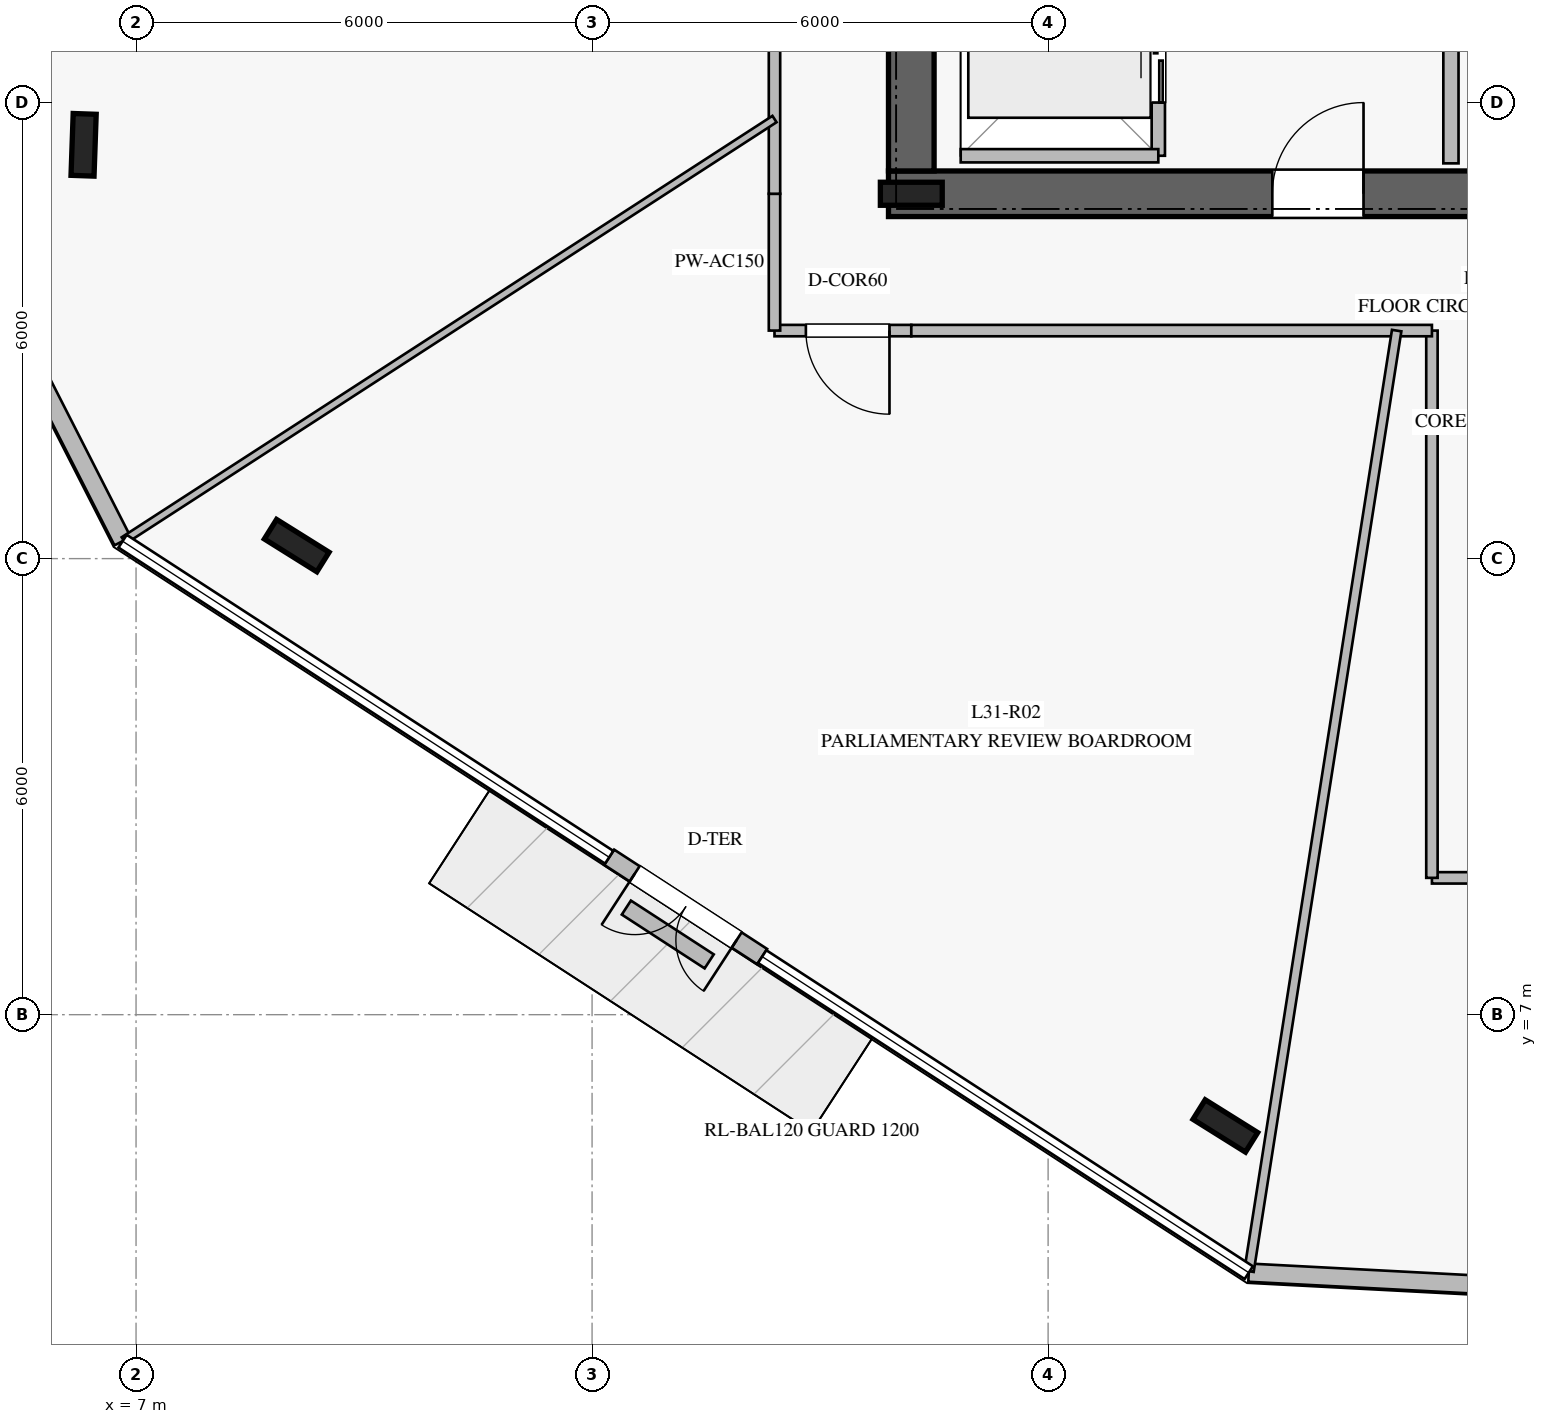
"""IFC4 building model, lengths in metres.
Left out: names, types, materials, properties, quantities, classifications, styles, units other than length and angle.
Written with IfcOpenShell. Run it as: python <this file> out.ifc"""

import sys

from ifc_helpers import new_model, si_unit, direction, frame, frame_2d, origin, origin_2d, place, context, subcontext, project, spatial, rectangle, i_section, extrude, element, fill, save


model = new_model("IFC4")
c1 = context("Model", 3, precision=1e-05, world=origin(), true_north=direction((0.0, 1.0)))
c2 = subcontext(c1, "Body", "Model", "MODEL_VIEW")
j1 = project(units=[si_unit("LENGTHUNIT", "METRE"), si_unit("PLANEANGLEUNIT", "RADIAN")], contexts=[c1])
p1 = place(None, origin())
s1 = spatial("IfcSite", under=j1, at=p1, CompositionType="ELEMENT")
p2 = place(p1, origin())
s2 = spatial("IfcBuilding", under=s1, at=p2, CompositionType="ELEMENT")
p3 = place(p2, frame((0.0, 0.0, 130.4)))
s3 = spatial("IfcBuildingStorey", under=s2, at=p3, CompositionType="ELEMENT", Elevation=130.4)
p4 = place(p3, frame((16.9, 17.8, 0.0), z_axis=(0.0, 0.0, 1.0), x_axis=(1.0, 0.0, 0.0)))
e1 = element("IfcWall", 1, at=p4, inside=s3, PredefinedType="SHEAR", context=c2, shape_type="SweptSolid", body=[
    extrude(rectangle(XDim=16.2, YDim=0.6, at=frame_2d((8.1, 0.0))), origin(), (0.0, 0.0, 1.0), 3.76),
])
p5 = place(p4, frame((5.05, 0.0, 0.0)))
e2 = element("IfcOpeningElement", 2, at=p5, cuts=e1, PredefinedType="OPENING", context=c2, shape_type="SweptSolid", body=[
    extrude(rectangle(XDim=1.2, YDim=2.25, at=frame_2d((0.6, 1.125))), frame((0.0, 0.31, 0.0), z_axis=(0.0, -1.0, 0.0), x_axis=(1.0, 0.0, 0.0)), (0.0, 0.0, 1.0), 0.62),
])
p6 = place(p4, frame((14.0, 0.0, 0.0)))
e3 = element("IfcOpeningElement", 3, at=p6, cuts=e1, PredefinedType="OPENING", context=c2, shape_type="SweptSolid", body=[
    extrude(rectangle(XDim=0.9, YDim=2.1, at=frame_2d((0.45, 1.05))), frame((0.0, 0.31, 0.0), z_axis=(0.0, -1.0, 0.0), x_axis=(1.0, 0.0, 0.0)), (0.0, 0.0, 1.0), 0.62),
])
p7 = place(p4, frame((9.25, 0.0, 0.0)))
e4 = element("IfcOpeningElement", 4, at=p7, cuts=e1, PredefinedType="OPENING", context=c2, shape_type="SweptSolid", body=[
    extrude(rectangle(XDim=1.1, YDim=2.2, at=frame_2d((0.55, 1.1))), frame((0.0, 0.31, 0.0), z_axis=(0.0, -1.0, 0.0), x_axis=(1.0, 0.0, 0.0)), (0.0, 0.0, 1.0), 0.62),
])
p8 = place(p3, frame((17.2, 31.9, 0.0), z_axis=(0.0, 0.0, 1.0), x_axis=(0.0, -1.0, 0.0)))
e5 = element("IfcWall", 5, at=p8, inside=s3, PredefinedType="SHEAR", context=c2, shape_type="SweptSolid", body=[
    extrude(rectangle(XDim=13.8, YDim=0.6, at=frame_2d((6.9, 0.0))), origin(), (0.0, 0.0, 1.0), 3.76),
])
p9 = place(p8, frame((2.05, 0.0, 0.0)))
e6 = element("IfcOpeningElement", 6, at=p9, cuts=e5, PredefinedType="OPENING", context=c2, shape_type="SweptSolid", body=[
    extrude(rectangle(XDim=1.5, YDim=2.2, at=frame_2d((0.75, 1.1))), frame((0.0, 0.31, 0.0), z_axis=(0.0, -1.0, 0.0), x_axis=(1.0, 0.0, 0.0)), (0.0, 0.0, 1.0), 0.62),
])
for number, where, z_axis, x_axis in (
    (7, (17.2, 17.8, 0.0), (0.0, 0.0, 1.0), (1.0, 0.0, 0.0)),
    (8, (6.31, 18.444, 0.0), (0.0, 0.0, 1.0), (0.035, 0.999, 0.0)),
    (9, (9.114, 13.171, 0.0), (0.0, 0.0, 1.0), (-0.848, 0.53, 0.0)),
    (10, (21.332, 5.536, 0.0), (0.0, 0.0, 1.0), (-0.848, 0.53, 0.0)),
):
    element("IfcColumn", number, at=place(p3, frame(where, z_axis=z_axis, x_axis=x_axis)), inside=s3, PredefinedType="COLUMN", context=c2, shape_type="SweptSolid", body=[
        extrude(i_section(OverallWidth=0.303, OverallDepth=0.814, WebThickness=0.021, FlangeThickness=0.04, at=origin_2d()), origin(), (0.0, 0.0, 1.0), 4.0),
    ])
p10 = place(p3, frame((4.793, 17.212, 0.0), z_axis=(0.0, 0.0, 1.0), x_axis=(0.454103301767, -0.89094903969, 0.0)))
e11 = element("IfcWall", 11, at=p10, inside=s3, PredefinedType="STANDARD", context=c2, shape_type="SweptSolid", body=[
    extrude(rectangle(XDim=4.47, YDim=0.24, at=frame_2d((2.235, 0.0))), origin(), (0.0, 0.0, 1.0), 3.76),
])
p11 = place(p3, frame((13.225, 9.071, 0.0), z_axis=(0.0, 0.0, 1.0), x_axis=(0.838687554781, -0.544612876689, 0.0)))
e12 = element("IfcWall", 12, at=p11, inside=s3, PredefinedType="STANDARD", context=c2, shape_type="SweptSolid", body=[
    extrude(rectangle(XDim=2.4, YDim=0.24, at=frame_2d((1.2, 0.0))), origin(), (0.0, 0.0, 1.0), 3.76),
])
p12 = place(p11, frame((0.4, 0.0, 0.0)))
e13 = element("IfcOpeningElement", 13, at=p12, cuts=e12, PredefinedType="OPENING", context=c2, shape_type="SweptSolid", body=[
    extrude(rectangle(XDim=1.6, YDim=2.25, at=frame_2d((0.8, 1.125))), frame((0.0, 0.13, 0.0), z_axis=(0.0, -1.0, 0.0), x_axis=(1.0, 0.0, 0.0)), (0.0, 0.0, 1.0), 0.26),
])
p13 = place(p3, frame((21.64, 3.606, 0.0), z_axis=(0.0, 0.0, 1.0), x_axis=(0.998630920983, -0.052309498732, 0.0)))
e14 = element("IfcWall", 14, at=p13, inside=s3, PredefinedType="STANDARD", context=c2, shape_type="SweptSolid", body=[
    extrude(rectangle(XDim=4.471, YDim=0.24, at=frame_2d((2.236, 0.0))), origin(), (0.0, 0.0, 1.0), 3.76),
])
p14 = place(p3, frame((13.451, 8.409, 0.0), z_axis=(0.0, 0.0, 1.0), x_axis=(0.838636669764, -0.544691230082, 0.0)))
e15 = element("IfcWall", 15, at=p14, inside=s3, PredefinedType="USERDEFINED", context=c2, shape_type="SweptSolid", body=[
    extrude(rectangle(XDim=1.3, YDim=0.22, at=frame_2d((0.65, 0.0))), origin(), (0.0, 0.0, 1.0), 0.4),
])
p15 = place(p3, frame((24.3, 18.2, 0.0), z_axis=(0.0, 0.0, 1.0), x_axis=(0.0, 1.0, 0.0)))
e16 = element("IfcWall", 16, at=p15, inside=s3, PredefinedType="PARTITIONING", context=c2, shape_type="SweptSolid", body=[
    extrude(rectangle(XDim=5.15, YDim=0.2, at=frame_2d((2.575, 0.0))), origin(), (0.0, 0.0, 1.0), 3.76),
])
p16 = place(p3, frame((20.45, 18.3, 0.0), z_axis=(0.0, 0.0, 1.0), x_axis=(0.0, 1.0, 0.0)))
e17 = element("IfcWall", 17, at=p16, inside=s3, PredefinedType="PARTITIONING", context=c2, shape_type="SweptSolid", body=[
    extrude(rectangle(XDim=2.6, YDim=0.175, at=frame_2d((1.3, 0.0))), origin(), (0.0, 0.0, 1.0), 3.76),
])
p17 = place(p16, frame((0.7, 0.0, 0.0)))
e18 = element("IfcOpeningElement", 18, at=p17, cuts=e17, PredefinedType="OPENING", context=c2, shape_type="SweptSolid", body=[
    extrude(rectangle(XDim=1.2, YDim=2.2, at=frame_2d((0.6, 1.1))), frame((0.0, 0.098, 0.0), z_axis=(0.0, -1.0, 0.0), x_axis=(1.0, 0.0, 0.0)), (0.0, 0.0, 1.0), 0.195),
])
p18 = place(p3, frame((17.85, 18.3, 0.0), z_axis=(0.0, 0.0, 1.0), x_axis=(1.0, 0.0, 0.0)))
e19 = element("IfcWall", 19, at=p18, inside=s3, PredefinedType="PARTITIONING", context=c2, shape_type="SweptSolid", body=[
    extrude(rectangle(XDim=2.6, YDim=0.175, at=frame_2d((1.3, 0.0))), origin(), (0.0, 0.0, 1.0), 3.76),
])
p19 = place(p3, frame((17.2, 16.0, 0.0), z_axis=(0.0, 0.0, 1.0), x_axis=(-1.0, 0.0, 0.0)))
e20 = element("IfcWall", 20, at=p19, inside=s3, PredefinedType="PARTITIONING", context=c2, shape_type="SweptSolid", body=[
    extrude(rectangle(XDim=1.8, YDim=0.15, at=frame_2d((0.9, 0.0))), origin(), (0.0, 0.0, 1.0), 3.36),
])
p20 = place(p19, frame((0.287, 0.0, 0.0)))
e21 = element("IfcOpeningElement", 21, at=p20, cuts=e20, PredefinedType="OPENING", context=c2, shape_type="SweptSolid", body=[
    extrude(rectangle(XDim=1.1, YDim=2.2, at=frame_2d((0.55, 1.1))), frame((0.0, 0.085, 0.0), z_axis=(0.0, -1.0, 0.0), x_axis=(1.0, 0.0, 0.0)), (0.0, 0.0, 1.0), 0.17),
])
p21 = place(p3, frame((15.4, 16.0, 0.0), z_axis=(0.0, 0.0, 1.0), x_axis=(0.0, 1.0, 0.0)))
e22 = element("IfcWall", 22, at=p21, inside=s3, PredefinedType="PARTITIONING", context=c2, shape_type="SweptSolid", body=[
    extrude(rectangle(XDim=1.8, YDim=0.15, at=frame_2d((0.9, 0.0))), origin(), (0.0, 0.0, 1.0), 3.21),
])
p22 = place(p3, frame((15.4, 17.8, 0.0), z_axis=(0.0, 0.0, 1.0), x_axis=(0.0, 1.0, 0.0)))
e23 = element("IfcWall", 23, at=p22, inside=s3, PredefinedType="PARTITIONING", context=c2, shape_type="SweptSolid", body=[
    extrude(rectangle(XDim=6.25, YDim=0.15, at=frame_2d((3.125, 0.0))), origin(), (0.0, 0.0, 1.0), 3.21),
])
p23 = place(p22, frame((2.859, 0.0, 0.0)))
e24 = element("IfcOpeningElement", 24, at=p23, cuts=e23, PredefinedType="OPENING", context=c2, shape_type="SweptSolid", body=[
    extrude(rectangle(XDim=1.1, YDim=2.2, at=frame_2d((0.55, 1.1))), frame((0.0, 0.085, 0.0), z_axis=(0.0, -1.0, 0.0), x_axis=(1.0, 0.0, 0.0)), (0.0, 0.0, 1.0), 0.17),
])
p24 = place(p3, frame((25.95, 8.8, 0.0), z_axis=(0.0, 0.0, 1.0), x_axis=(-1.0, 0.0, 0.0)))
e25 = element("IfcWall", 25, at=p24, inside=s3, PredefinedType="PARTITIONING", context=c2, shape_type="SweptSolid", body=[
    extrude(rectangle(XDim=1.9, YDim=0.15, at=frame_2d((0.95, 0.0))), origin(), (0.0, 0.0, 1.0), 3.76),
])
p25 = place(p3, frame((24.05, 8.8, 0.0), z_axis=(0.0, 0.0, 1.0), x_axis=(0.0, 1.0, 0.0)))
e26 = element("IfcWall", 26, at=p25, inside=s3, PredefinedType="PARTITIONING", context=c2, shape_type="SweptSolid", body=[
    extrude(rectangle(XDim=7.2, YDim=0.15, at=frame_2d((3.6, 0.0))), origin(), (0.0, 0.0, 1.0), 3.36),
])
p26 = place(p3, frame((24.05, 16.0, 0.0), z_axis=(0.0, 0.0, 1.0), x_axis=(-1.0, 0.0, 0.0)))
e27 = element("IfcWall", 27, at=p26, inside=s3, PredefinedType="PARTITIONING", context=c2, shape_type="SweptSolid", body=[
    extrude(rectangle(XDim=6.85, YDim=0.15, at=frame_2d((3.425, 0.0))), origin(), (0.0, 0.0, 1.0), 3.21),
])
p27 = place(p3, frame((15.4, 18.783, 0.0), z_axis=(0.0, 0.0, 1.0), x_axis=(-0.839399301713, -0.543515236478, 0.0)))
e28 = element("IfcWall", 28, at=p27, inside=s3, PredefinedType="MOVABLE", context=c2, shape_type="SweptSolid", body=[
    extrude(rectangle(XDim=10.2, YDim=0.1, at=frame_2d((5.1, 0.0))), origin(), (0.0, 0.0, 1.0), 3.16),
])
p28 = place(p3, frame((23.586, 16.0, 0.0), z_axis=(0.0, 0.0, 1.0), x_axis=(-0.155099800777, -0.987898806457, 0.0)))
e29 = element("IfcWall", 29, at=p28, inside=s3, PredefinedType="PARTITIONING", context=c2, shape_type="SweptSolid", body=[
    extrude(rectangle(XDim=12.527, YDim=0.125, at=frame_2d((6.263, 0.0))), origin(), (0.0, 0.0, 1.0), 3.16),
])
p29 = place(p12, frame((1.6, 0.0, 0.0), z_axis=(0.0, 0.0, 1.0), x_axis=(-1.0, 0.0, 0.0)))
e30 = element("IfcDoor", 30, at=p29, inside=s3, OperationType="DOUBLE_DOOR_SINGLE_SWING", PredefinedType="DOOR", context=c2, shape_type="SweptSolid", body=[
    extrude(rectangle(XDim=1.6, YDim=2.25, at=frame_2d((0.8, 1.125))), frame((0.0, 0.025, 0.0), z_axis=(0.0, -1.0, 0.0), x_axis=(1.0, 0.0, 0.0)), (0.0, 0.0, 1.0), 0.05),
])
fill(e13, e30)
p30 = place(p5, origin())
e31 = element("IfcDoor", 31, at=p30, inside=s3, OperationType="SINGLE_SWING_RIGHT", PredefinedType="DOOR", context=c2, shape_type="SweptSolid", body=[
    extrude(rectangle(XDim=1.2, YDim=2.25, at=frame_2d((0.6, 1.125))), frame((0.0, 0.025, 0.0), z_axis=(0.0, -1.0, 0.0), x_axis=(1.0, 0.0, 0.0)), (0.0, 0.0, 1.0), 0.05),
])
fill(e2, e31)
p31 = place(p17, origin())
e32 = element("IfcDoor", 32, at=p31, inside=s3, OperationType="DOUBLE_DOOR_SLIDING", PredefinedType="DOOR", context=c2, shape_type="SweptSolid", body=[
    extrude(rectangle(XDim=1.2, YDim=2.2, at=frame_2d((0.6, 1.1))), frame((0.0, 0.025, 0.0), z_axis=(0.0, -1.0, 0.0), x_axis=(1.0, 0.0, 0.0)), (0.0, 0.0, 1.0), 0.05),
])
fill(e18, e32)
p32 = place(p20, origin())
e33 = element("IfcDoor", 33, at=p32, inside=s3, OperationType="SINGLE_SWING_LEFT", PredefinedType="DOOR", context=c2, shape_type="SweptSolid", body=[
    extrude(rectangle(XDim=1.1, YDim=2.2, at=frame_2d((0.55, 1.1))), frame((0.0, 0.025, 0.0), z_axis=(0.0, -1.0, 0.0), x_axis=(1.0, 0.0, 0.0)), (0.0, 0.0, 1.0), 0.05),
])
fill(e21, e33)
save(model, sys.argv[1])
